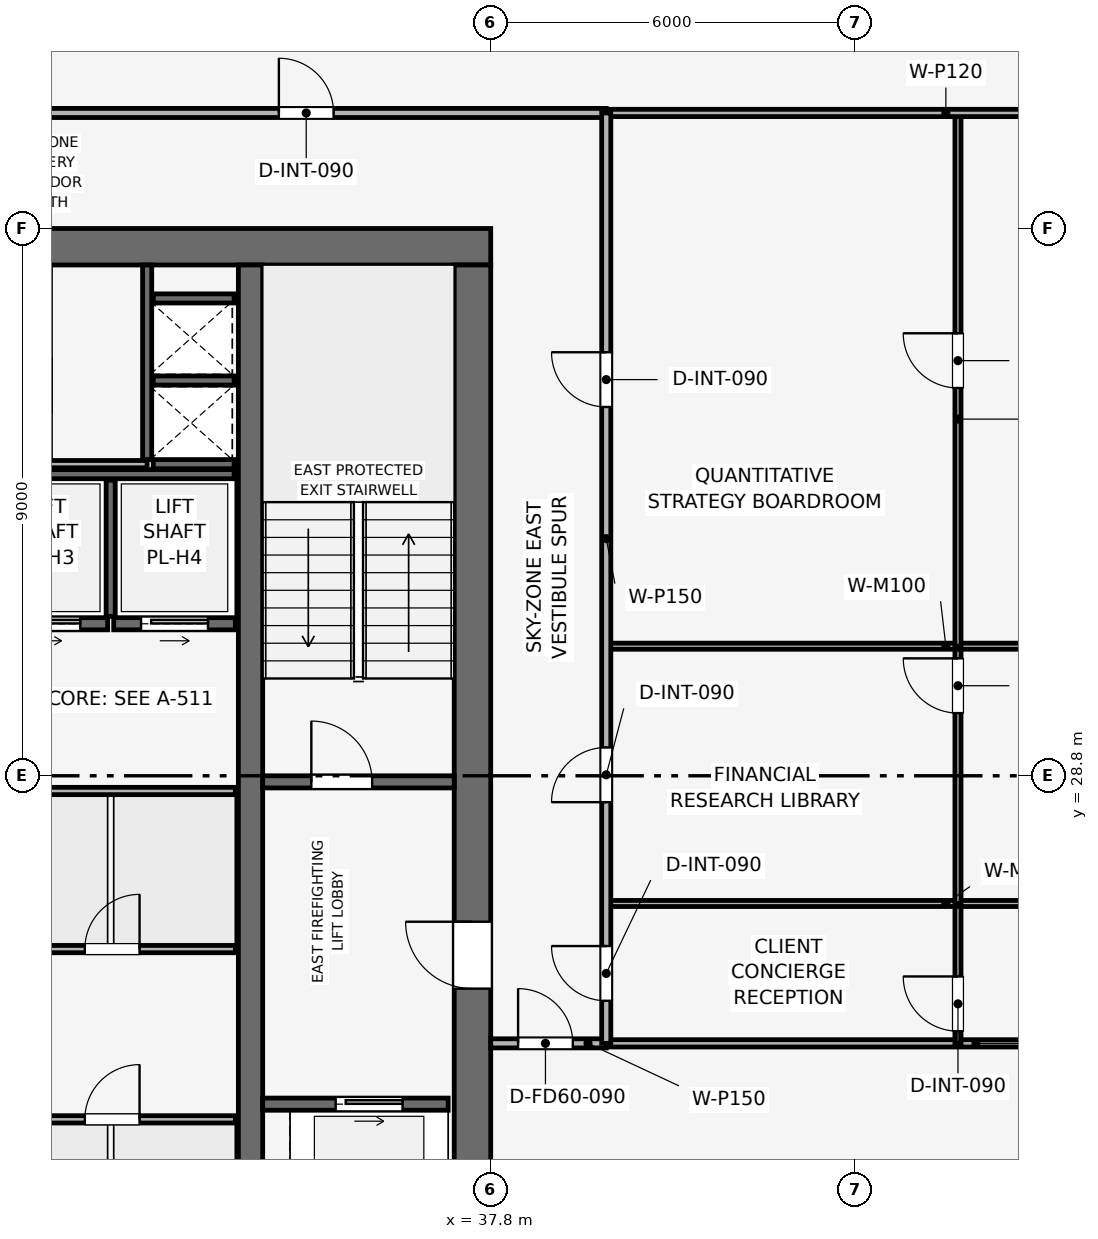
"""IFC4 building model, lengths in metres.
Left out: names, types, materials, properties, quantities, classifications, styles, units other than length and angle.
Written with IfcOpenShell. Run it as: python <this file> out.ifc"""

import sys

from ifc_helpers import new_model, si_unit, direction, frame, frame_2d, origin, place, context, subcontext, project, spatial, rectangle, extrude, element, fill, save


model = new_model("IFC4")
c1 = context("Model", 3, precision=1e-05, world=origin(), true_north=direction((0.0, 1.0)))
c2 = subcontext(c1, "Body", "Model", "MODEL_VIEW")
j1 = project(units=[si_unit("LENGTHUNIT", "METRE"), si_unit("PLANEANGLEUNIT", "RADIAN")], contexts=[c1])
p1 = place(None, origin())
s1 = spatial("IfcSite", under=j1, at=p1, CompositionType="ELEMENT")
p2 = place(p1, origin())
s2 = spatial("IfcBuilding", under=s1, at=p2, CompositionType="ELEMENT")
p3 = place(p2, frame((0.0, 0.0, 336.75)))
s3 = spatial("IfcBuildingStorey", under=s2, at=p3, CompositionType="ELEMENT", Elevation=336.75)
p4 = place(p3, frame((19.8, 37.5, 0.0), z_axis=(0.0, 0.0, 1.0), x_axis=(1.0, 0.0, 0.0)))
e1 = element("IfcWall", 1, at=p4, inside=s3, PredefinedType="SHEAR", context=c2, shape_type="SweptSolid", body=[
    extrude(rectangle(XDim=18.0, YDim=0.6, at=frame_2d((9.0, 0.0))), origin(), (0.0, 0.0, 1.0), 3.75),
])
p5 = place(p4, frame((7.05, 0.0, 0.0)))
e2 = element("IfcOpeningElement", 2, at=p5, cuts=e1, PredefinedType="OPENING", context=c2, shape_type="SweptSolid", body=[
    extrude(rectangle(XDim=1.1, YDim=2.15, at=frame_2d((0.55, 1.075))), frame((0.0, 0.31, 0.0), z_axis=(0.0, -1.0, 0.0), x_axis=(1.0, 0.0, 0.0)), (0.0, 0.0, 1.0), 0.62),
])
p6 = place(p3, frame((37.5, 20.4, 0.0), z_axis=(0.0, 0.0, 1.0), x_axis=(0.0, 1.0, 0.0)))
e3 = element("IfcWall", 3, at=p6, inside=s3, PredefinedType="SHEAR", context=c2, shape_type="SweptSolid", body=[
    extrude(rectangle(XDim=16.8, YDim=0.6, at=frame_2d((8.4, 0.0))), origin(), (0.0, 0.0, 1.0), 3.75),
])
p7 = place(p6, frame((4.9, 0.0, 0.0)))
e4 = element("IfcOpeningElement", 4, at=p7, cuts=e3, PredefinedType="OPENING", context=c2, shape_type="SweptSolid", body=[
    extrude(rectangle(XDim=1.1, YDim=2.15, at=frame_2d((0.55, 1.075))), frame((0.0, 0.31, 0.0), z_axis=(0.0, -1.0, 0.0), x_axis=(1.0, 0.0, 0.0)), (0.0, 0.0, 1.0), 0.62),
])
p8 = place(p3, frame((33.85, 20.4, 0.0), z_axis=(0.0, 0.0, 1.0), x_axis=(0.0, 1.0, 0.0)))
e5 = element("IfcWall", 5, at=p8, inside=s3, PredefinedType="SHEAR", context=c2, shape_type="SweptSolid", body=[
    extrude(rectangle(XDim=16.8, YDim=0.4, at=frame_2d((8.4, 0.0))), origin(), (0.0, 0.0, 1.0), 3.75),
])
p9 = place(p3, frame((34.05, 28.7, 0.0), z_axis=(0.0, 0.0, 1.0), x_axis=(1.0, 0.0, 0.0)))
e6 = element("IfcWall", 6, at=p9, inside=s3, PredefinedType="SHEAR", context=c2, shape_type="SweptSolid", body=[
    extrude(rectangle(XDim=3.15, YDim=0.2, at=frame_2d((1.575, 0.0))), origin(), (0.0, 0.0, 1.0), 3.51),
])
p10 = place(p9, frame((0.8, 0.0, 0.0)))
e7 = element("IfcOpeningElement", 7, at=p10, cuts=e6, PredefinedType="OPENING", context=c2, shape_type="SweptSolid", body=[
    extrude(rectangle(XDim=1.0, YDim=2.1, at=frame_2d((0.5, 1.05))), frame((0.0, 0.11, 0.0), z_axis=(0.0, -1.0, 0.0), x_axis=(1.0, 0.0, 0.0)), (0.0, 0.0, 1.0), 0.22),
])
p11 = place(p3, frame((32.15, 34.0, 0.0), z_axis=(0.0, 0.0, 1.0), x_axis=(0.0, 1.0, 0.0)))
e8 = element("IfcWall", 8, at=p11, inside=s3, PredefinedType="SHEAR", context=c2, shape_type="SweptSolid", body=[
    extrude(rectangle(XDim=3.2, YDim=0.15, at=frame_2d((1.6, 0.0))), origin(), (0.0, 0.0, 1.0), 3.51),
])
for number, where, z_axis, x_axis in (
    (9, (32.25, 33.925, 0.0), (0.0, 0.0, 1.0), (1.0, 0.0, 0.0)),
    (10, (32.25, 35.3, 0.0), (0.0, 0.0, 1.0), (1.0, 0.0, 0.0)),
):
    element("IfcWall", number, at=place(p3, frame(where, z_axis=z_axis, x_axis=x_axis)), inside=s3, PredefinedType="SHEAR", context=c2, shape_type="SweptSolid", body=[
        extrude(rectangle(XDim=1.33, YDim=0.15, at=frame_2d((0.665, 0.0))), origin(), (0.0, 0.0, 1.0), 3.51),
    ])
p12 = place(p3, frame((34.05, 23.4, 0.0), z_axis=(0.0, 0.0, 1.0), x_axis=(1.0, 0.0, 0.0)))
e11 = element("IfcWall", 11, at=p12, inside=s3, PredefinedType="SHEAR", context=c2, shape_type="SweptSolid", body=[
    extrude(rectangle(XDim=3.05, YDim=0.2, at=frame_2d((1.525, 0.0))), origin(), (0.0, 0.0, 1.0), 3.51),
])
p13 = place(p12, frame((1.2, 0.0, 0.0)))
e12 = element("IfcOpeningElement", 12, at=p13, cuts=e11, PredefinedType="OPENING", context=c2, shape_type="SweptSolid", body=[
    extrude(rectangle(XDim=1.1, YDim=2.15, at=frame_2d((0.55, 1.075))), frame((0.0, 0.11, 0.0), z_axis=(0.0, -1.0, 0.0), x_axis=(1.0, 0.0, 0.0)), (0.0, 0.0, 1.0), 0.22),
])
p14 = place(p3, frame((29.5, 31.3, 0.0), z_axis=(0.0, 0.0, 1.0), x_axis=(1.0, 0.0, 0.0)))
e13 = element("IfcWall", 13, at=p14, inside=s3, PredefinedType="SHEAR", context=c2, shape_type="SweptSolid", body=[
    extrude(rectangle(XDim=2.0, YDim=0.2, at=frame_2d((1.0, 0.0))), origin(), (0.0, 0.0, 1.0), 3.51),
])
p15 = place(p14, frame((0.45, 0.0, 0.0)))
e14 = element("IfcOpeningElement", 14, at=p15, cuts=e13, PredefinedType="OPENING", context=c2, shape_type="SweptSolid", body=[
    extrude(rectangle(XDim=1.1, YDim=2.15, at=frame_2d((0.55, 1.075))), frame((0.0, 0.11, 0.0), z_axis=(0.0, -1.0, 0.0), x_axis=(1.0, 0.0, 0.0)), (0.0, 0.0, 1.0), 0.22),
])
p16 = place(p3, frame((31.6, 31.3, 0.0), z_axis=(0.0, 0.0, 1.0), x_axis=(1.0, 0.0, 0.0)))
e15 = element("IfcWall", 15, at=p16, inside=s3, PredefinedType="SHEAR", context=c2, shape_type="SweptSolid", body=[
    extrude(rectangle(XDim=2.0, YDim=0.2, at=frame_2d((1.0, 0.0))), origin(), (0.0, 0.0, 1.0), 3.51),
])
p17 = place(p16, frame((0.45, 0.0, 0.0)))
e16 = element("IfcOpeningElement", 16, at=p17, cuts=e15, PredefinedType="OPENING", context=c2, shape_type="SweptSolid", body=[
    extrude(rectangle(XDim=1.1, YDim=2.15, at=frame_2d((0.55, 1.075))), frame((0.0, 0.11, 0.0), z_axis=(0.0, -1.0, 0.0), x_axis=(1.0, 0.0, 0.0)), (0.0, 0.0, 1.0), 0.22),
])
p18 = place(p3, frame((32.25, 36.65, 0.0), z_axis=(0.0, 0.0, 1.0), x_axis=(1.0, 0.0, 0.0)))
e17 = element("IfcWall", 17, at=p18, inside=s3, PredefinedType="SHEAR", context=c2, shape_type="SweptSolid", body=[
    extrude(rectangle(XDim=1.33, YDim=0.15, at=frame_2d((0.665, 0.0))), origin(), (0.0, 0.0, 1.0), 3.51),
])
p19 = place(p3, frame((29.5, 33.76, 0.0), z_axis=(0.0, 0.0, 1.0), x_axis=(1.0, 0.0, 0.0)))
e18 = element("IfcWall", 18, at=p19, inside=s3, PredefinedType="SHEAR", context=c2, shape_type="SweptSolid", body=[
    extrude(rectangle(XDim=4.08, YDim=0.15, at=frame_2d((2.04, 0.0))), origin(), (0.0, 0.0, 1.0), 3.51),
])
p20 = place(p3, frame((31.55, 31.42, 0.0), z_axis=(0.0, 0.0, 1.0), x_axis=(0.0, 1.0, 0.0)))
e19 = element("IfcWall", 19, at=p20, inside=s3, PredefinedType="SHEAR", context=c2, shape_type="SweptSolid", body=[
    extrude(rectangle(XDim=2.24, YDim=0.15, at=frame_2d((1.12, 0.0))), origin(), (0.0, 0.0, 1.0), 3.51),
])
p21 = place(p3, frame((30.5, 33.925, 0.0), z_axis=(0.0, 0.0, 1.0), x_axis=(1.0, 0.0, 0.0)))
e20 = element("IfcWall", 20, at=p21, inside=s3, PredefinedType="PARTITIONING", context=c2, shape_type="SweptSolid", body=[
    extrude(rectangle(XDim=1.65, YDim=0.12, at=frame_2d((0.825, 0.0))), origin(), (0.0, 0.0, 1.0), 3.51),
])
p22 = place(p3, frame((29.55, 23.15, 0.0), z_axis=(0.0, 0.0, 1.0), x_axis=(1.0, 0.0, 0.0)))
e21 = element("IfcWall", 21, at=p22, inside=s3, PredefinedType="PARTITIONING", context=c2, shape_type="SweptSolid", body=[
    extrude(rectangle(XDim=4.05, YDim=0.12, at=frame_2d((2.025, 0.0))), origin(), (0.0, 0.0, 1.0), 3.51),
])
p23 = place(p22, frame((1.575, 0.0, 0.0)))
e22 = element("IfcOpeningElement", 22, at=p23, cuts=e21, PredefinedType="OPENING", context=c2, shape_type="SweptSolid", body=[
    extrude(rectangle(XDim=0.9, YDim=2.1, at=frame_2d((0.45, 1.05))), frame((0.0, 0.07, 0.0), z_axis=(0.0, -1.0, 0.0), x_axis=(1.0, 0.0, 0.0)), (0.0, 0.0, 1.0), 0.14),
])
p24 = place(p3, frame((29.55, 25.95, 0.0), z_axis=(0.0, 0.0, 1.0), x_axis=(1.0, 0.0, 0.0)))
e23 = element("IfcWall", 23, at=p24, inside=s3, PredefinedType="PARTITIONING", context=c2, shape_type="SweptSolid", body=[
    extrude(rectangle(XDim=4.05, YDim=0.12, at=frame_2d((2.025, 0.0))), origin(), (0.0, 0.0, 1.0), 3.51),
])
p25 = place(p24, frame((1.575, 0.0, 0.0)))
e24 = element("IfcOpeningElement", 24, at=p25, cuts=e23, PredefinedType="OPENING", context=c2, shape_type="SweptSolid", body=[
    extrude(rectangle(XDim=0.9, YDim=2.1, at=frame_2d((0.45, 1.05))), frame((0.0, 0.07, 0.0), z_axis=(0.0, -1.0, 0.0), x_axis=(1.0, 0.0, 0.0)), (0.0, 0.0, 1.0), 0.14),
])
p26 = place(p3, frame((29.55, 28.55, 0.0), z_axis=(0.0, 0.0, 1.0), x_axis=(1.0, 0.0, 0.0)))
e25 = element("IfcWall", 25, at=p26, inside=s3, PredefinedType="PARTITIONING", context=c2, shape_type="SweptSolid", body=[
    extrude(rectangle(XDim=4.05, YDim=0.12, at=frame_2d((2.025, 0.0))), origin(), (0.0, 0.0, 1.0), 3.51),
])
p27 = place(p3, frame((37.8, 24.4, 0.0), z_axis=(0.0, 0.0, 1.0), x_axis=(1.0, 0.0, 0.0)))
e26 = element("IfcWall", 26, at=p27, inside=s3, PredefinedType="PARTITIONING", context=c2, shape_type="SweptSolid", body=[
    extrude(rectangle(XDim=1.9, YDim=0.15, at=frame_2d((0.95, 0.0))), origin(), (0.0, 0.0, 1.0), 3.51),
])
p28 = place(p27, frame((0.45, 0.0, 0.0)))
e27 = element("IfcOpeningElement", 27, at=p28, cuts=e26, PredefinedType="OPENING", context=c2, shape_type="SweptSolid", body=[
    extrude(rectangle(XDim=0.9, YDim=2.1, at=frame_2d((0.45, 1.05))), frame((0.0, 0.085, 0.0), z_axis=(0.0, -1.0, 0.0), x_axis=(1.0, 0.0, 0.0)), (0.0, 0.0, 1.0), 0.17),
])
p29 = place(p3, frame((39.7, 24.4, 0.0), z_axis=(0.0, 0.0, 1.0), x_axis=(1.0, 0.0, 0.0)))
e28 = element("IfcWall", 28, at=p29, inside=s3, PredefinedType="PARTITIONING", context=c2, shape_type="SweptSolid", body=[
    extrude(rectangle(XDim=11.17, YDim=0.12, at=frame_2d((5.585, 0.0))), origin(), (0.0, 0.0, 1.0), 3.135),
])
p30 = place(p3, frame((45.484, 24.4, 0.0), z_axis=(0.0, 0.0, 1.0), x_axis=(0.0, 1.0, 0.0)))
e29 = element("IfcWall", 29, at=p30, inside=s3, PredefinedType="MOVABLE", context=c2, shape_type="SweptSolid", body=[
    extrude(rectangle(XDim=2.3, YDim=0.1, at=frame_2d((1.15, 0.0))), origin(), (0.0, 0.0, 1.0), 3.51),
])
p31 = place(p30, frame((0.2, 0.0, 0.0)))
e30 = element("IfcOpeningElement", 30, at=p31, cuts=e29, PredefinedType="OPENING", context=c2, shape_type="SweptSolid", body=[
    extrude(rectangle(XDim=0.9, YDim=2.1, at=frame_2d((0.45, 1.05))), frame((0.0, 0.06, 0.0), z_axis=(0.0, -1.0, 0.0), x_axis=(1.0, 0.0, 0.0)), (0.0, 0.0, 1.0), 0.12),
])
p32 = place(p3, frame((39.7, 26.7, 0.0), z_axis=(0.0, 0.0, 1.0), x_axis=(1.0, 0.0, 0.0)))
e31 = element("IfcWall", 31, at=p32, inside=s3, PredefinedType="MOVABLE", context=c2, shape_type="SweptSolid", body=[
    extrude(rectangle(XDim=11.17, YDim=0.1, at=frame_2d((5.585, 0.0))), origin(), (0.0, 0.0, 1.0), 3.135),
])
p33 = place(p3, frame((45.484, 26.7, 0.0), z_axis=(0.0, 0.0, 1.0), x_axis=(0.0, 1.0, 0.0)))
e32 = element("IfcWall", 32, at=p33, inside=s3, PredefinedType="MOVABLE", context=c2, shape_type="SweptSolid", body=[
    extrude(rectangle(XDim=4.231, YDim=0.1, at=frame_2d((2.115, 0.0))), origin(), (0.0, 0.0, 1.0), 3.095),
])
p34 = place(p33, frame((3.131, 0.0, 0.0)))
e33 = element("IfcOpeningElement", 33, at=p34, cuts=e32, PredefinedType="OPENING", context=c2, shape_type="SweptSolid", body=[
    extrude(rectangle(XDim=0.9, YDim=2.1, at=frame_2d((0.45, 1.05))), frame((0.0, 0.06, 0.0), z_axis=(0.0, -1.0, 0.0), x_axis=(1.0, 0.0, 0.0)), (0.0, 0.0, 1.0), 0.12),
])
p35 = place(p3, frame((39.7, 30.931, 0.0), z_axis=(0.0, 0.0, 1.0), x_axis=(1.0, 0.0, 0.0)))
e34 = element("IfcWall", 34, at=p35, inside=s3, PredefinedType="MOVABLE", context=c2, shape_type="SweptSolid", body=[
    extrude(rectangle(XDim=11.17, YDim=0.1, at=frame_2d((5.585, 0.0))), origin(), (0.0, 0.0, 1.0), 3.135),
])
p36 = place(p3, frame((45.484, 30.931, 0.0), z_axis=(0.0, 0.0, 1.0), x_axis=(0.0, 1.0, 0.0)))
e35 = element("IfcWall", 35, at=p36, inside=s3, PredefinedType="MOVABLE", context=c2, shape_type="SweptSolid", body=[
    extrude(rectangle(XDim=8.769, YDim=0.1, at=frame_2d((4.385, 0.0))), origin(), (0.0, 0.0, 1.0), 3.095),
])
p37 = place(p36, frame((4.246, 0.0, 0.0)))
e36 = element("IfcOpeningElement", 36, at=p37, cuts=e35, PredefinedType="OPENING", context=c2, shape_type="SweptSolid", body=[
    extrude(rectangle(XDim=0.9, YDim=2.1, at=frame_2d((0.45, 1.05))), frame((0.0, 0.06, 0.0), z_axis=(0.0, -1.0, 0.0), x_axis=(1.0, 0.0, 0.0)), (0.0, 0.0, 1.0), 0.12),
])
p38 = place(p3, frame((39.7, 39.7, 0.0), z_axis=(0.0, 0.0, 1.0), x_axis=(1.0, 0.0, 0.0)))
e37 = element("IfcWall", 37, at=p38, inside=s3, PredefinedType="PARTITIONING", context=c2, shape_type="SweptSolid", body=[
    extrude(rectangle(XDim=11.17, YDim=0.12, at=frame_2d((5.585, 0.0))), origin(), (0.0, 0.0, 1.0), 3.095),
])
p39 = place(p3, frame((17.9, 39.7, 0.0), z_axis=(0.0, 0.0, 1.0), x_axis=(1.0, 0.0, 0.0)))
e38 = element("IfcWall", 38, at=p39, inside=s3, PredefinedType="PARTITIONING", context=c2, shape_type="SweptSolid", body=[
    extrude(rectangle(XDim=21.8, YDim=0.15, at=frame_2d((10.9, 0.0))), origin(), (0.0, 0.0, 1.0), 3.095),
])
p40 = place(p39, frame((5.516, 0.0, 0.0)))
e39 = element("IfcOpeningElement", 39, at=p40, cuts=e38, PredefinedType="OPENING", context=c2, shape_type="SweptSolid", body=[
    extrude(rectangle(XDim=0.9, YDim=2.1, at=frame_2d((0.45, 1.05))), frame((0.0, 0.085, 0.0), z_axis=(0.0, -1.0, 0.0), x_axis=(1.0, 0.0, 0.0)), (0.0, 0.0, 1.0), 0.17),
])
p41 = place(p39, frame((16.416, 0.0, 0.0)))
e40 = element("IfcOpeningElement", 40, at=p41, cuts=e38, PredefinedType="OPENING", context=c2, shape_type="SweptSolid", body=[
    extrude(rectangle(XDim=0.9, YDim=2.1, at=frame_2d((0.45, 1.05))), frame((0.0, 0.085, 0.0), z_axis=(0.0, -1.0, 0.0), x_axis=(1.0, 0.0, 0.0)), (0.0, 0.0, 1.0), 0.17),
])
p42 = place(p3, frame((39.7, 24.4, 0.0), z_axis=(0.0, 0.0, 1.0), x_axis=(0.0, 1.0, 0.0)))
e41 = element("IfcWall", 41, at=p42, inside=s3, PredefinedType="PARTITIONING", context=c2, shape_type="SweptSolid", body=[
    extrude(rectangle(XDim=15.3, YDim=0.15, at=frame_2d((7.65, 0.0))), origin(), (0.0, 0.0, 1.0), 3.095),
])
p43 = place(p42, frame((0.7, 0.0, 0.0)))
e42 = element("IfcOpeningElement", 42, at=p43, cuts=e41, PredefinedType="OPENING", context=c2, shape_type="SweptSolid", body=[
    extrude(rectangle(XDim=0.9, YDim=2.1, at=frame_2d((0.45, 1.05))), frame((0.0, 0.085, 0.0), z_axis=(0.0, -1.0, 0.0), x_axis=(1.0, 0.0, 0.0)), (0.0, 0.0, 1.0), 0.17),
])
p44 = place(p42, frame((3.966, 0.0, 0.0)))
e43 = element("IfcOpeningElement", 43, at=p44, cuts=e41, PredefinedType="OPENING", context=c2, shape_type="SweptSolid", body=[
    extrude(rectangle(XDim=0.9, YDim=2.1, at=frame_2d((0.45, 1.05))), frame((0.0, 0.085, 0.0), z_axis=(0.0, -1.0, 0.0), x_axis=(1.0, 0.0, 0.0)), (0.0, 0.0, 1.0), 0.17),
])
p45 = place(p42, frame((10.465, 0.0, 0.0)))
e44 = element("IfcOpeningElement", 44, at=p45, cuts=e41, PredefinedType="OPENING", context=c2, shape_type="SweptSolid", body=[
    extrude(rectangle(XDim=0.9, YDim=2.1, at=frame_2d((0.45, 1.05))), frame((0.0, 0.085, 0.0), z_axis=(0.0, -1.0, 0.0), x_axis=(1.0, 0.0, 0.0)), (0.0, 0.0, 1.0), 0.17),
])
p46 = place(p10, origin())
e45 = element("IfcDoor", 45, at=p46, inside=s3, OperationType="SINGLE_SWING_LEFT", PredefinedType="DOOR", context=c2, shape_type="SweptSolid", body=[
    extrude(rectangle(XDim=1.0, YDim=2.1, at=frame_2d((0.5, 1.05))), frame((0.0, 0.025, 0.0), z_axis=(0.0, -1.0, 0.0), x_axis=(1.0, 0.0, 0.0)), (0.0, 0.0, 1.0), 0.05),
])
fill(e7, e45)
p47 = place(p13, origin())
e46 = element("IfcDoor", 46, at=p47, inside=s3, OperationType="SLIDING_TO_RIGHT", PredefinedType="DOOR", context=c2, shape_type="SweptSolid", body=[
    extrude(rectangle(XDim=1.1, YDim=2.15, at=frame_2d((0.55, 1.075))), frame((0.0, 0.025, 0.0), z_axis=(0.0, -1.0, 0.0), x_axis=(1.0, 0.0, 0.0)), (0.0, 0.0, 1.0), 0.05),
])
fill(e12, e46)
p48 = place(p15, origin())
e47 = element("IfcDoor", 47, at=p48, inside=s3, OperationType="SLIDING_TO_RIGHT", PredefinedType="DOOR", context=c2, shape_type="SweptSolid", body=[
    extrude(rectangle(XDim=1.1, YDim=2.15, at=frame_2d((0.55, 1.075))), frame((0.0, 0.025, 0.0), z_axis=(0.0, -1.0, 0.0), x_axis=(1.0, 0.0, 0.0)), (0.0, 0.0, 1.0), 0.05),
])
fill(e14, e47)
p49 = place(p17, origin())
e48 = element("IfcDoor", 48, at=p49, inside=s3, OperationType="SLIDING_TO_RIGHT", PredefinedType="DOOR", context=c2, shape_type="SweptSolid", body=[
    extrude(rectangle(XDim=1.1, YDim=2.15, at=frame_2d((0.55, 1.075))), frame((0.0, 0.025, 0.0), z_axis=(0.0, -1.0, 0.0), x_axis=(1.0, 0.0, 0.0)), (0.0, 0.0, 1.0), 0.05),
])
fill(e16, e48)
p50 = place(p23, origin())
e49 = element("IfcDoor", 49, at=p50, inside=s3, OperationType="SINGLE_SWING_RIGHT", PredefinedType="DOOR", context=c2, shape_type="SweptSolid", body=[
    extrude(rectangle(XDim=0.9, YDim=2.1, at=frame_2d((0.45, 1.05))), frame((0.0, 0.025, 0.0), z_axis=(0.0, -1.0, 0.0), x_axis=(1.0, 0.0, 0.0)), (0.0, 0.0, 1.0), 0.05),
])
fill(e22, e49)
p51 = place(p25, origin())
e50 = element("IfcDoor", 50, at=p51, inside=s3, OperationType="SINGLE_SWING_RIGHT", PredefinedType="DOOR", context=c2, shape_type="SweptSolid", body=[
    extrude(rectangle(XDim=0.9, YDim=2.1, at=frame_2d((0.45, 1.05))), frame((0.0, 0.025, 0.0), z_axis=(0.0, -1.0, 0.0), x_axis=(1.0, 0.0, 0.0)), (0.0, 0.0, 1.0), 0.05),
])
fill(e24, e50)
p52 = place(p28, origin())
e51 = element("IfcDoor", 51, at=p52, inside=s3, OperationType="SINGLE_SWING_LEFT", PredefinedType="DOOR", context=c2, shape_type="SweptSolid", body=[
    extrude(rectangle(XDim=0.9, YDim=2.1, at=frame_2d((0.45, 1.05))), frame((0.0, 0.025, 0.0), z_axis=(0.0, -1.0, 0.0), x_axis=(1.0, 0.0, 0.0)), (0.0, 0.0, 1.0), 0.05),
])
fill(e27, e51)
p53 = place(p31, origin())
e52 = element("IfcDoor", 52, at=p53, inside=s3, OperationType="SINGLE_SWING_RIGHT", PredefinedType="DOOR", context=c2, shape_type="SweptSolid", body=[
    extrude(rectangle(XDim=0.9, YDim=2.1, at=frame_2d((0.45, 1.05))), frame((0.0, 0.025, 0.0), z_axis=(0.0, -1.0, 0.0), x_axis=(1.0, 0.0, 0.0)), (0.0, 0.0, 1.0), 0.05),
])
fill(e30, e52)
p54 = place(p34, origin())
e53 = element("IfcDoor", 53, at=p54, inside=s3, OperationType="SINGLE_SWING_RIGHT", PredefinedType="DOOR", context=c2, shape_type="SweptSolid", body=[
    extrude(rectangle(XDim=0.9, YDim=2.1, at=frame_2d((0.45, 1.05))), frame((0.0, 0.025, 0.0), z_axis=(0.0, -1.0, 0.0), x_axis=(1.0, 0.0, 0.0)), (0.0, 0.0, 1.0), 0.05),
])
fill(e33, e53)
p55 = place(p37, origin())
e54 = element("IfcDoor", 54, at=p55, inside=s3, OperationType="SINGLE_SWING_RIGHT", PredefinedType="DOOR", context=c2, shape_type="SweptSolid", body=[
    extrude(rectangle(XDim=0.9, YDim=2.1, at=frame_2d((0.45, 1.05))), frame((0.0, 0.025, 0.0), z_axis=(0.0, -1.0, 0.0), x_axis=(1.0, 0.0, 0.0)), (0.0, 0.0, 1.0), 0.05),
])
fill(e36, e54)
p56 = place(p41, origin())
e55 = element("IfcDoor", 55, at=p56, inside=s3, OperationType="SINGLE_SWING_LEFT", PredefinedType="DOOR", context=c2, shape_type="SweptSolid", body=[
    extrude(rectangle(XDim=0.9, YDim=2.1, at=frame_2d((0.45, 1.05))), frame((0.0, 0.025, 0.0), z_axis=(0.0, -1.0, 0.0), x_axis=(1.0, 0.0, 0.0)), (0.0, 0.0, 1.0), 0.05),
])
fill(e40, e55)
p57 = place(p43, origin())
e56 = element("IfcDoor", 56, at=p57, inside=s3, OperationType="SINGLE_SWING_RIGHT", PredefinedType="DOOR", context=c2, shape_type="SweptSolid", body=[
    extrude(rectangle(XDim=0.9, YDim=2.1, at=frame_2d((0.45, 1.05))), frame((0.0, 0.025, 0.0), z_axis=(0.0, -1.0, 0.0), x_axis=(1.0, 0.0, 0.0)), (0.0, 0.0, 1.0), 0.05),
])
fill(e42, e56)
p58 = place(p44, origin())
e57 = element("IfcDoor", 57, at=p58, inside=s3, OperationType="SINGLE_SWING_LEFT", PredefinedType="DOOR", context=c2, shape_type="SweptSolid", body=[
    extrude(rectangle(XDim=0.9, YDim=2.1, at=frame_2d((0.45, 1.05))), frame((0.0, 0.025, 0.0), z_axis=(0.0, -1.0, 0.0), x_axis=(1.0, 0.0, 0.0)), (0.0, 0.0, 1.0), 0.05),
])
fill(e43, e57)
p59 = place(p45, origin())
e58 = element("IfcDoor", 58, at=p59, inside=s3, OperationType="SINGLE_SWING_RIGHT", PredefinedType="DOOR", context=c2, shape_type="SweptSolid", body=[
    extrude(rectangle(XDim=0.9, YDim=2.1, at=frame_2d((0.45, 1.05))), frame((0.0, 0.025, 0.0), z_axis=(0.0, -1.0, 0.0), x_axis=(1.0, 0.0, 0.0)), (0.0, 0.0, 1.0), 0.05),
])
fill(e44, e58)
p60 = place(p7, origin())
e59 = element("IfcDoor", 59, at=p60, inside=s3, OperationType="SINGLE_SWING_RIGHT", PredefinedType="DOOR", context=c2, shape_type="SweptSolid", body=[
    extrude(rectangle(XDim=1.1, YDim=2.15, at=frame_2d((0.55, 1.075))), frame((0.0, 0.025, 0.0), z_axis=(0.0, -1.0, 0.0), x_axis=(1.0, 0.0, 0.0)), (0.0, 0.0, 1.0), 0.05),
])
fill(e4, e59)
save(model, sys.argv[1])
